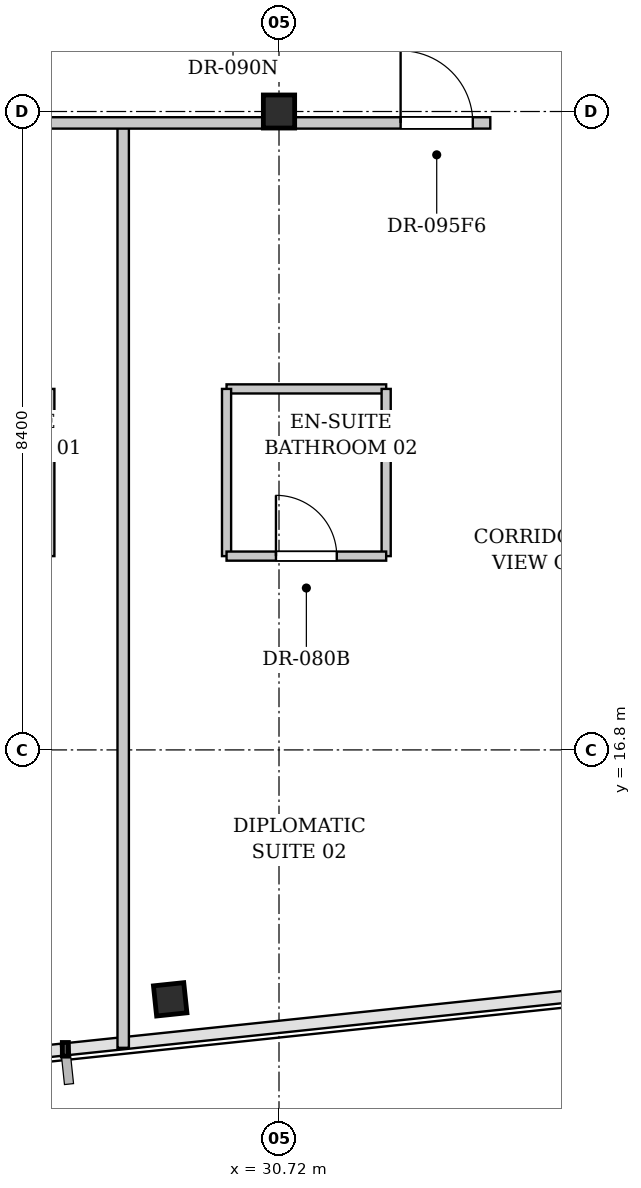
"""IFC4 building model, lengths in metres.
Left out: names, types, materials, properties, quantities, classifications, styles, units other than length and angle.
Written with IfcOpenShell. Run it as: python <this file> out.ifc"""

import sys

from ifc_helpers import new_model, si_unit, direction, frame, frame_2d, origin, origin_2d, place, context, subcontext, project, spatial, rectangle, i_section, extrude, element, fill, save


model = new_model("IFC4")
c1 = context("Model", 3, precision=1e-05, world=origin(), true_north=direction((0.0, 1.0)))
c2 = subcontext(c1, "Body", "Model", "MODEL_VIEW")
j1 = project(units=[si_unit("LENGTHUNIT", "METRE"), si_unit("PLANEANGLEUNIT", "RADIAN")], contexts=[c1])
p1 = place(None, origin())
s1 = spatial("IfcSite", under=j1, at=p1, CompositionType="ELEMENT")
p2 = place(p1, origin())
s2 = spatial("IfcBuilding", under=s1, at=p2, CompositionType="ELEMENT")
p3 = place(p2, frame((0.0, 0.0, 237.5)))
s3 = spatial("IfcBuildingStorey", under=s2, at=p3, CompositionType="ELEMENT", Elevation=237.5)
p4 = place(p3, frame((30.72, 25.2, 0.0), z_axis=(0.0, 0.0, 1.0), x_axis=(1.0, 0.0, 0.0)))
e1 = element("IfcColumn", 1, at=p4, inside=s3, PredefinedType="COLUMN", context=c2, shape_type="SweptSolid", body=[
    extrude(i_section(OverallWidth=0.412, OverallDepth=0.435, WebThickness=0.036, FlangeThickness=0.058, FilletRadius=0.015, at=origin_2d()), origin(), (0.0, 0.0, 1.0), 3.3),
])
p5 = place(p3, frame((29.288, 13.518, 0.0), z_axis=(0.0, 0.0, 1.0), x_axis=(0.994521895368, 0.104528463268, 0.0)))
e2 = element("IfcColumn", 2, at=p5, inside=s3, PredefinedType="COLUMN", context=c2, shape_type="SweptSolid", body=[
    extrude(i_section(OverallWidth=0.401, OverallDepth=0.399, WebThickness=0.025, FlangeThickness=0.04, FilletRadius=0.015, at=origin_2d()), origin(), (0.0, 0.0, 1.0), 3.3),
])
p6 = place(p3, frame((27.705, 19.35, 0.0), z_axis=(0.0, 0.0, 1.0), x_axis=(0.0, 1.0, 0.0)))
e3 = element("IfcWall", 3, at=p6, inside=s3, PredefinedType="PARTITIONING", context=c2, shape_type="SweptSolid", body=[
    extrude(rectangle(XDim=2.2, YDim=0.12, at=frame_2d((1.1, 0.0))), origin(), (0.0, 0.0, 1.0), 3.08),
])
p7 = place(p3, frame((30.03, 21.55, 0.0), z_axis=(0.0, 0.0, 1.0), x_axis=(1.0, 0.0, 0.0)))
e4 = element("IfcWall", 4, at=p7, inside=s3, PredefinedType="PARTITIONING", context=c2, shape_type="SweptSolid", body=[
    extrude(rectangle(XDim=2.1, YDim=0.12, at=frame_2d((1.05, 0.0))), origin(), (0.0, 0.0, 1.0), 3.08),
])
p8 = place(p3, frame((30.03, 19.35, 0.0), z_axis=(0.0, 0.0, 1.0), x_axis=(0.0, 1.0, 0.0)))
e5 = element("IfcWall", 5, at=p8, inside=s3, PredefinedType="PARTITIONING", context=c2, shape_type="SweptSolid", body=[
    extrude(rectangle(XDim=2.2, YDim=0.12, at=frame_2d((1.1, 0.0))), origin(), (0.0, 0.0, 1.0), 2.313),
])
p9 = place(p3, frame((32.13, 19.35, 0.0), z_axis=(0.0, 0.0, 1.0), x_axis=(0.0, 1.0, 0.0)))
e6 = element("IfcWall", 6, at=p9, inside=s3, PredefinedType="PARTITIONING", context=c2, shape_type="SweptSolid", body=[
    extrude(rectangle(XDim=2.2, YDim=0.12, at=frame_2d((1.1, 0.0))), origin(), (0.0, 0.0, 1.0), 3.08),
])
p10 = place(p3, frame((30.03, 19.35, 0.0), z_axis=(0.0, 0.0, 1.0), x_axis=(1.0, 0.0, 0.0)))
e7 = element("IfcWall", 7, at=p10, inside=s3, PredefinedType="PARTITIONING", context=c2, shape_type="SweptSolid", body=[
    extrude(rectangle(XDim=2.1, YDim=0.12, at=frame_2d((1.05, 0.0))), origin(), (0.0, 0.0, 1.0), 3.08),
])
p11 = place(p10, frame((0.65, 0.0, 0.0)))
e8 = element("IfcOpeningElement", 8, at=p11, cuts=e7, PredefinedType="OPENING", context=c2, shape_type="SweptSolid", body=[
    extrude(rectangle(XDim=0.8, YDim=2.1, at=frame_2d((0.4, 1.05))), frame((0.0, 0.07, 0.0), z_axis=(0.0, -1.0, 0.0), x_axis=(1.0, 0.0, 0.0)), (0.0, 0.0, 1.0), 0.14),
])
p12 = place(p3, frame((28.67, 12.88, 0.0), z_axis=(0.0, 0.0, 1.0), x_axis=(0.0, 1.0, 0.0)))
e9 = element("IfcWall", 9, at=p12, inside=s3, PredefinedType="PARTITIONING", context=c2, shape_type="SweptSolid", body=[
    extrude(rectangle(XDim=12.19, YDim=0.15, at=frame_2d((6.095, 0.0))), origin(), (0.0, 0.0, 1.0), 3.08),
])
p13 = place(p3, frame((17.314, 25.05, 0.0), z_axis=(0.0, 0.0, 1.0), x_axis=(1.0, 0.0, 0.0)))
e10 = element("IfcWall", 10, at=p13, inside=s3, PredefinedType="PARTITIONING", context=c2, shape_type="SweptSolid", body=[
    extrude(rectangle(XDim=16.186, YDim=0.15, at=frame_2d((8.093, 0.0))), origin(), (0.0, 0.0, 1.0), 2.313),
])
p14 = place(p13, frame((8.981, 0.0, 0.0)))
e11 = element("IfcOpeningElement", 11, at=p14, cuts=e10, PredefinedType="OPENING", context=c2, shape_type="SweptSolid", body=[
    extrude(rectangle(XDim=0.95, YDim=2.15, at=frame_2d((0.475, 1.075))), frame((0.0, 0.085, 0.0), z_axis=(0.0, -1.0, 0.0), x_axis=(1.0, 0.0, 0.0)), (0.0, 0.0, 1.0), 0.17),
])
p15 = place(p13, frame((15.006, 0.0, 0.0)))
e12 = element("IfcOpeningElement", 12, at=p15, cuts=e10, PredefinedType="OPENING", context=c2, shape_type="SweptSolid", body=[
    extrude(rectangle(XDim=0.95, YDim=2.15, at=frame_2d((0.475, 1.075))), frame((0.0, 0.085, 0.0), z_axis=(0.0, -1.0, 0.0), x_axis=(1.0, 0.0, 0.0)), (0.0, 0.0, 1.0), 0.17),
])
p16 = place(p11, origin())
e13 = element("IfcDoor", 13, at=p16, inside=s3, OperationType="SINGLE_SWING_LEFT", PredefinedType="DOOR", context=c2, shape_type="SweptSolid", body=[
    extrude(rectangle(XDim=0.8, YDim=2.1, at=frame_2d((0.4, 1.05))), frame((0.0, 0.025, 0.0), z_axis=(0.0, -1.0, 0.0), x_axis=(1.0, 0.0, 0.0)), (0.0, 0.0, 1.0), 0.05),
])
fill(e8, e13)
p17 = place(p15, origin())
e14 = element("IfcDoor", 14, at=p17, inside=s3, OperationType="SINGLE_SWING_LEFT", PredefinedType="DOOR", context=c2, shape_type="SweptSolid", body=[
    extrude(rectangle(XDim=0.95, YDim=2.15, at=frame_2d((0.475, 1.075))), frame((0.0, 0.025, 0.0), z_axis=(0.0, -1.0, 0.0), x_axis=(1.0, 0.0, 0.0)), (0.0, 0.0, 1.0), 0.05),
])
fill(e12, e14)
save(model, sys.argv[1])
